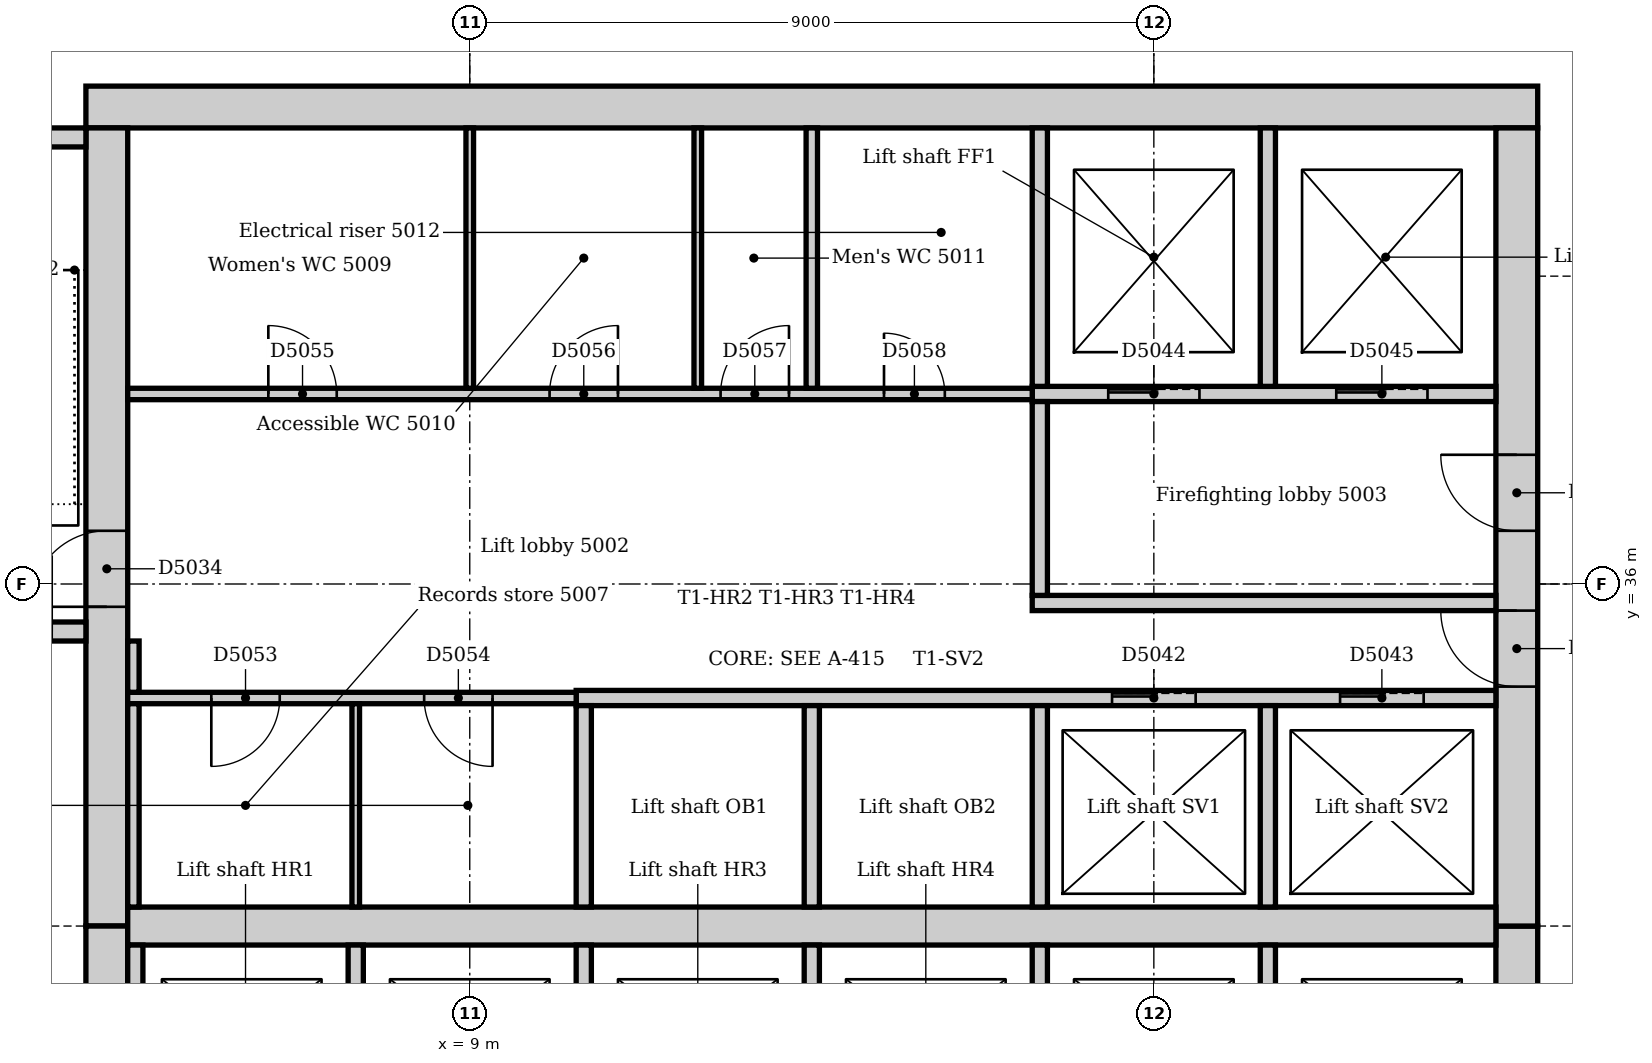
"""IFC4 building model, lengths in metres.
Left out: names, types, materials, properties, quantities, classifications, styles, units other than length and angle.
Written with IfcOpenShell. Run it as: python <this file> out.ifc"""

import sys

from ifc_helpers import new_model, si_unit, direction, frame, frame_2d, origin, place, context, subcontext, project, spatial, rectangle, extrude, element, fill, save


model = new_model("IFC4")
c1 = context("Model", 3, precision=1e-05, world=origin(), true_north=direction((0.0, 1.0)))
c2 = subcontext(c1, "Body", "Model", "MODEL_VIEW")
j1 = project(units=[si_unit("LENGTHUNIT", "METRE"), si_unit("PLANEANGLEUNIT", "RADIAN")], contexts=[c1])
p1 = place(None, origin())
s1 = spatial("IfcSite", under=j1, at=p1, CompositionType="ELEMENT")
p2 = place(p1, origin())
s2 = spatial("IfcBuilding", under=s1, at=p2, CompositionType="ELEMENT")
p3 = place(p2, frame((0.0, 0.0, 210.0)))
s3 = spatial("IfcBuildingStorey", under=s2, at=p3, CompositionType="ELEMENT", Elevation=210.0)
p4 = place(p3, frame((23.05, 42.275, 0.0), z_axis=(0.0, 0.0, 1.0), x_axis=(-1.0, 0.0, 0.0)))
e1 = element("IfcWall", 1, at=p4, inside=s3, PredefinedType="SOLIDWALL", context=c2, shape_type="SweptSolid", body=[
    extrude(rectangle(XDim=19.1, YDim=0.55, at=frame_2d((9.55, 0.0))), origin(), (0.0, 0.0, 1.0), 4.0),
])
p5 = place(p3, frame((22.775, 21.0, 0.0), z_axis=(0.0, 0.0, 1.0), x_axis=(0.0, 1.0, 0.0)))
e2 = element("IfcWall", 2, at=p5, inside=s3, PredefinedType="SOLIDWALL", context=c2, shape_type="SweptSolid", body=[
    extrude(rectangle(XDim=10.5, YDim=0.55, at=frame_2d((5.25, 0.0))), origin(), (0.0, 0.0, 1.0), 4.0),
])
p6 = place(p5, frame((4.35, 0.0, 0.0)))
e3 = element("IfcOpeningElement", 3, at=p6, cuts=e2, PredefinedType="OPENING", context=c2, shape_type="SweptSolid", body=[
    extrude(rectangle(XDim=1.8, YDim=2.1, at=frame_2d((0.9, 1.05))), frame((0.0, 0.285, 0.0), z_axis=(0.0, -1.0, 0.0), x_axis=(1.0, 0.0, 0.0)), (0.0, 0.0, 1.0), 0.57),
])
p7 = place(p3, frame((22.775, 31.5, 0.0), z_axis=(0.0, 0.0, 1.0), x_axis=(0.0, 1.0, 0.0)))
e4 = element("IfcWall", 4, at=p7, inside=s3, PredefinedType="SOLIDWALL", context=c2, shape_type="SweptSolid", body=[
    extrude(rectangle(XDim=10.5, YDim=0.55, at=frame_2d((5.25, 0.0))), origin(), (0.0, 0.0, 1.0), 4.0),
])
p8 = place(p7, frame((3.15, 0.0, 0.0)))
e5 = element("IfcOpeningElement", 5, at=p8, cuts=e4, PredefinedType="OPENING", context=c2, shape_type="SweptSolid", body=[
    extrude(rectangle(XDim=1.0, YDim=2.1, at=frame_2d((0.5, 1.05))), frame((0.0, 0.285, 0.0), z_axis=(0.0, -1.0, 0.0), x_axis=(1.0, 0.0, 0.0)), (0.0, 0.0, 1.0), 0.57),
])
p9 = place(p7, frame((5.2, 0.0, 0.0)))
e6 = element("IfcOpeningElement", 6, at=p9, cuts=e4, PredefinedType="OPENING", context=c2, shape_type="SweptSolid", body=[
    extrude(rectangle(XDim=1.0, YDim=2.1, at=frame_2d((0.5, 1.05))), frame((0.0, 0.285, 0.0), z_axis=(0.0, -1.0, 0.0), x_axis=(1.0, 0.0, 0.0)), (0.0, 0.0, 1.0), 0.57),
])
p10 = place(p3, frame((4.225, 42.0, 0.0), z_axis=(0.0, 0.0, 1.0), x_axis=(0.0, -1.0, 0.0)))
e7 = element("IfcWall", 7, at=p10, inside=s3, PredefinedType="SOLIDWALL", context=c2, shape_type="SweptSolid", body=[
    extrude(rectangle(XDim=10.5, YDim=0.55, at=frame_2d((5.25, 0.0))), origin(), (0.0, 0.0, 1.0), 4.0),
])
p11 = place(p10, frame((5.3, 0.0, 0.0)))
e8 = element("IfcOpeningElement", 8, at=p11, cuts=e7, PredefinedType="OPENING", context=c2, shape_type="SweptSolid", body=[
    extrude(rectangle(XDim=1.0, YDim=2.1, at=frame_2d((0.5, 1.05))), frame((0.0, 0.285, 0.0), z_axis=(0.0, -1.0, 0.0), x_axis=(1.0, 0.0, 0.0)), (0.0, 0.0, 1.0), 0.57),
])
p12 = place(p3, frame((4.225, 31.5, 0.0), z_axis=(0.0, 0.0, 1.0), x_axis=(0.0, -1.0, 0.0)))
e9 = element("IfcWall", 9, at=p12, inside=s3, PredefinedType="SOLIDWALL", context=c2, shape_type="SweptSolid", body=[
    extrude(rectangle(XDim=10.5, YDim=0.55, at=frame_2d((5.25, 0.0))), origin(), (0.0, 0.0, 1.0), 4.0),
])
p13 = place(p12, frame((4.25, 0.0, 0.0)))
e10 = element("IfcOpeningElement", 10, at=p13, cuts=e9, PredefinedType="OPENING", context=c2, shape_type="SweptSolid", body=[
    extrude(rectangle(XDim=1.0, YDim=2.1, at=frame_2d((0.5, 1.05))), frame((0.0, 0.285, 0.0), z_axis=(0.0, -1.0, 0.0), x_axis=(1.0, 0.0, 0.0)), (0.0, 0.0, 1.0), 0.57),
])
p14 = place(p3, frame((4.5, 31.5, 0.0), z_axis=(0.0, 0.0, 1.0), x_axis=(1.0, 0.0, 0.0)))
e11 = element("IfcWall", 11, at=p14, inside=s3, PredefinedType="SOLIDWALL", context=c2, shape_type="SweptSolid", body=[
    extrude(rectangle(XDim=18.0, YDim=0.5, at=frame_2d((9.0, 0.0))), origin(), (0.0, 0.0, 1.0), 4.0),
])
p15 = place(p3, frame((0.36, 35.375, 0.0), z_axis=(0.0, 0.0, 1.0), x_axis=(1.0, 0.0, 0.0)))
e12 = element("IfcWall", 12, at=p15, inside=s3, PredefinedType="SOLIDWALL", context=c2, shape_type="SweptSolid", body=[
    extrude(rectangle(XDim=3.59, YDim=0.25, at=frame_2d((1.795, 0.0))), origin(), (0.0, 0.0, 1.0), 4.0),
])
p16 = place(p15, frame((2.14, 0.0, 0.0)))
e13 = element("IfcOpeningElement", 13, at=p16, cuts=e12, PredefinedType="OPENING", context=c2, shape_type="SweptSolid", body=[
    extrude(rectangle(XDim=1.0, YDim=2.1, at=frame_2d((0.5, 1.05))), frame((0.0, 0.135, 0.0), z_axis=(0.0, -1.0, 0.0), x_axis=(1.0, 0.0, 0.0)), (0.0, 0.0, 1.0), 0.27),
])
p17 = place(p3, frame((3.95, 41.875, 0.0), z_axis=(0.0, 0.0, 1.0), x_axis=(-1.0, 0.0, 0.0)))
e14 = element("IfcWall", 14, at=p17, inside=s3, PredefinedType="SOLIDWALL", context=c2, shape_type="SweptSolid", body=[
    extrude(rectangle(XDim=3.59, YDim=0.25, at=frame_2d((1.795, 0.0))), origin(), (0.0, 0.0, 1.0), 4.0),
])
p18 = place(p3, frame((16.4, 35.75, 0.0), z_axis=(0.0, 0.0, 1.0), x_axis=(1.0, 0.0, 0.0)))
e15 = element("IfcWall", 15, at=p18, inside=s3, PredefinedType="PARTITIONING", context=c2, shape_type="SweptSolid", body=[
    extrude(rectangle(XDim=6.1, YDim=0.2, at=frame_2d((3.05, 0.0))), origin(), (0.0, 0.0, 1.0), 3.85),
])
p19 = place(p3, frame((16.4, 38.5, 0.0), z_axis=(0.0, 0.0, 1.0), x_axis=(1.0, 0.0, 0.0)))
e16 = element("IfcWall", 16, at=p19, inside=s3, PredefinedType="PARTITIONING", context=c2, shape_type="SweptSolid", body=[
    extrude(rectangle(XDim=6.1, YDim=0.2, at=frame_2d((3.05, 0.0))), origin(), (0.0, 0.0, 1.0), 3.85),
])
p20 = place(p19, frame((1.0, 0.0, 0.0)))
e17 = element("IfcOpeningElement", 17, at=p20, cuts=e16, PredefinedType="OPENING", context=c2, shape_type="SweptSolid", body=[
    extrude(rectangle(XDim=1.2, YDim=2.1, at=frame_2d((0.6, 1.05))), frame((0.0, 0.11, 0.0), z_axis=(0.0, -1.0, 0.0), x_axis=(1.0, 0.0, 0.0)), (0.0, 0.0, 1.0), 0.22),
])
p21 = place(p19, frame((4.0, 0.0, 0.0)))
e18 = element("IfcOpeningElement", 18, at=p21, cuts=e16, PredefinedType="OPENING", context=c2, shape_type="SweptSolid", body=[
    extrude(rectangle(XDim=1.2, YDim=2.1, at=frame_2d((0.6, 1.05))), frame((0.0, 0.11, 0.0), z_axis=(0.0, -1.0, 0.0), x_axis=(1.0, 0.0, 0.0)), (0.0, 0.0, 1.0), 0.22),
])
p22 = place(p3, frame((16.5, 35.85, 0.0), z_axis=(0.0, 0.0, 1.0), x_axis=(0.0, 1.0, 0.0)))
e19 = element("IfcWall", 19, at=p22, inside=s3, PredefinedType="PARTITIONING", context=c2, shape_type="SweptSolid", body=[
    extrude(rectangle(XDim=2.55, YDim=0.2, at=frame_2d((1.275, 0.0))), origin(), (0.0, 0.0, 1.0), 3.85),
])
p23 = place(p3, frame((10.4, 34.5, 0.0), z_axis=(0.0, 0.0, 1.0), x_axis=(1.0, 0.0, 0.0)))
e20 = element("IfcWall", 20, at=p23, inside=s3, PredefinedType="PARTITIONING", context=c2, shape_type="SweptSolid", body=[
    extrude(rectangle(XDim=12.1, YDim=0.2, at=frame_2d((6.05, 0.0))), origin(), (0.0, 0.0, 1.0), 3.85),
])
p24 = place(p23, frame((7.05, 0.0, 0.0)))
e21 = element("IfcOpeningElement", 21, at=p24, cuts=e20, PredefinedType="OPENING", context=c2, shape_type="SweptSolid", body=[
    extrude(rectangle(XDim=1.1, YDim=2.1, at=frame_2d((0.55, 1.05))), frame((0.0, 0.11, 0.0), z_axis=(0.0, -1.0, 0.0), x_axis=(1.0, 0.0, 0.0)), (0.0, 0.0, 1.0), 0.22),
])
p25 = place(p23, frame((10.05, 0.0, 0.0)))
e22 = element("IfcOpeningElement", 22, at=p25, cuts=e20, PredefinedType="OPENING", context=c2, shape_type="SweptSolid", body=[
    extrude(rectangle(XDim=1.1, YDim=2.1, at=frame_2d((0.55, 1.05))), frame((0.0, 0.11, 0.0), z_axis=(0.0, -1.0, 0.0), x_axis=(1.0, 0.0, 0.0)), (0.0, 0.0, 1.0), 0.22),
])
for number, where, z_axis, x_axis in (
    (23, (10.5, 28.6, 0.0), (0.0, 0.0, 1.0), (0.0, 1.0, 0.0)),
    (24, (10.5, 31.75, 0.0), (0.0, 0.0, 1.0), (0.0, 1.0, 0.0)),
    (25, (13.5, 28.6, 0.0), (0.0, 0.0, 1.0), (0.0, 1.0, 0.0)),
    (26, (13.5, 31.75, 0.0), (0.0, 0.0, 1.0), (0.0, 1.0, 0.0)),
    (27, (16.5, 28.6, 0.0), (0.0, 0.0, 1.0), (0.0, 1.0, 0.0)),
    (28, (16.5, 31.75, 0.0), (0.0, 0.0, 1.0), (0.0, 1.0, 0.0)),
    (29, (19.5, 28.6, 0.0), (0.0, 0.0, 1.0), (0.0, 1.0, 0.0)),
    (30, (19.5, 31.75, 0.0), (0.0, 0.0, 1.0), (0.0, 1.0, 0.0)),
):
    element("IfcWall", number, at=place(p3, frame(where, z_axis=z_axis, x_axis=x_axis)), inside=s3, PredefinedType="PARTITIONING", context=c2, shape_type="SweptSolid", body=[
        extrude(rectangle(XDim=2.65, YDim=0.2, at=frame_2d((1.325, 0.0))), origin(), (0.0, 0.0, 1.0), 3.85),
    ])
for number, where, z_axis, x_axis in (
    (31, (16.5, 38.6, 0.0), (0.0, 0.0, 1.0), (0.0, 1.0, 0.0)),
    (32, (19.5, 38.6, 0.0), (0.0, 0.0, 1.0), (0.0, 1.0, 0.0)),
):
    element("IfcWall", number, at=place(p3, frame(where, z_axis=z_axis, x_axis=x_axis)), inside=s3, PredefinedType="PARTITIONING", context=c2, shape_type="SweptSolid", body=[
        extrude(rectangle(XDim=3.4, YDim=0.2, at=frame_2d((1.7, 0.0))), origin(), (0.0, 0.0, 1.0), 3.85),
    ])
for number, where, z_axis, x_axis in (
    (33, (4.6, 28.6, 0.0), (0.0, 0.0, 1.0), (0.0, 1.0, 0.0)),
    (34, (7.5, 28.6, 0.0), (0.0, 0.0, 1.0), (0.0, 1.0, 0.0)),
):
    element("IfcWall", number, at=place(p3, frame(where, z_axis=z_axis, x_axis=x_axis)), inside=s3, PredefinedType="PARTITIONING", context=c2, shape_type="SweptSolid", body=[
        extrude(rectangle(XDim=2.65, YDim=0.2, at=frame_2d((1.325, 0.0))), origin(), (0.0, 0.0, 1.0), 3.85),
    ])
p26 = place(p3, frame((4.5, 38.5, 0.0), z_axis=(0.0, 0.0, 1.0), x_axis=(1.0, 0.0, 0.0)))
e35 = element("IfcWall", 35, at=p26, inside=s3, PredefinedType="PARTITIONING", context=c2, shape_type="SweptSolid", body=[
    extrude(rectangle(XDim=11.9, YDim=0.15, at=frame_2d((5.95, 0.0))), origin(), (0.0, 0.0, 1.0), 3.85),
])
p27 = place(p26, frame((1.85, 0.0, 0.0)))
e36 = element("IfcOpeningElement", 36, at=p27, cuts=e35, PredefinedType="OPENING", context=c2, shape_type="SweptSolid", body=[
    extrude(rectangle(XDim=0.9, YDim=2.1, at=frame_2d((0.45, 1.05))), frame((0.0, 0.085, 0.0), z_axis=(0.0, -1.0, 0.0), x_axis=(1.0, 0.0, 0.0)), (0.0, 0.0, 1.0), 0.17),
])
p28 = place(p26, frame((5.55, 0.0, 0.0)))
e37 = element("IfcOpeningElement", 37, at=p28, cuts=e35, PredefinedType="OPENING", context=c2, shape_type="SweptSolid", body=[
    extrude(rectangle(XDim=0.9, YDim=2.1, at=frame_2d((0.45, 1.05))), frame((0.0, 0.085, 0.0), z_axis=(0.0, -1.0, 0.0), x_axis=(1.0, 0.0, 0.0)), (0.0, 0.0, 1.0), 0.17),
])
p29 = place(p26, frame((7.8, 0.0, 0.0)))
e38 = element("IfcOpeningElement", 38, at=p29, cuts=e35, PredefinedType="OPENING", context=c2, shape_type="SweptSolid", body=[
    extrude(rectangle(XDim=0.9, YDim=2.1, at=frame_2d((0.45, 1.05))), frame((0.0, 0.085, 0.0), z_axis=(0.0, -1.0, 0.0), x_axis=(1.0, 0.0, 0.0)), (0.0, 0.0, 1.0), 0.17),
])
p30 = place(p26, frame((9.95, 0.0, 0.0)))
e39 = element("IfcOpeningElement", 39, at=p30, cuts=e35, PredefinedType="OPENING", context=c2, shape_type="SweptSolid", body=[
    extrude(rectangle(XDim=0.8, YDim=2.1, at=frame_2d((0.4, 1.05))), frame((0.0, 0.085, 0.0), z_axis=(0.0, -1.0, 0.0), x_axis=(1.0, 0.0, 0.0)), (0.0, 0.0, 1.0), 0.17),
])
p31 = place(p3, frame((4.5, 34.5, 0.0), z_axis=(0.0, 0.0, 1.0), x_axis=(1.0, 0.0, 0.0)))
e40 = element("IfcWall", 40, at=p31, inside=s3, PredefinedType="PARTITIONING", context=c2, shape_type="SweptSolid", body=[
    extrude(rectangle(XDim=5.9, YDim=0.15, at=frame_2d((2.95, 0.0))), origin(), (0.0, 0.0, 1.0), 3.85),
])
p32 = place(p31, frame((1.1, 0.0, 0.0)))
e41 = element("IfcOpeningElement", 41, at=p32, cuts=e40, PredefinedType="OPENING", context=c2, shape_type="SweptSolid", body=[
    extrude(rectangle(XDim=0.9, YDim=2.1, at=frame_2d((0.45, 1.05))), frame((0.0, 0.085, 0.0), z_axis=(0.0, -1.0, 0.0), x_axis=(1.0, 0.0, 0.0)), (0.0, 0.0, 1.0), 0.17),
])
p33 = place(p31, frame((3.9, 0.0, 0.0)))
e42 = element("IfcOpeningElement", 42, at=p33, cuts=e40, PredefinedType="OPENING", context=c2, shape_type="SweptSolid", body=[
    extrude(rectangle(XDim=0.9, YDim=2.1, at=frame_2d((0.45, 1.05))), frame((0.0, 0.085, 0.0), z_axis=(0.0, -1.0, 0.0), x_axis=(1.0, 0.0, 0.0)), (0.0, 0.0, 1.0), 0.17),
])
p34 = place(p3, frame((4.575, 34.575, 0.0), z_axis=(0.0, 0.0, 1.0), x_axis=(0.0, 1.0, 0.0)))
e43 = element("IfcWall", 43, at=p34, inside=s3, PredefinedType="PARTITIONING", context=c2, shape_type="SweptSolid", body=[
    extrude(rectangle(XDim=0.675, YDim=0.15, at=frame_2d((0.338, 0.0))), origin(), (0.0, 0.0, 1.0), 3.85),
])
p35 = place(p3, frame((4.575, 31.75, 0.0), z_axis=(0.0, 0.0, 1.0), x_axis=(0.0, 1.0, 0.0)))
e44 = element("IfcWall", 44, at=p35, inside=s3, PredefinedType="PARTITIONING", context=c2, shape_type="SweptSolid", body=[
    extrude(rectangle(XDim=2.675, YDim=0.15, at=frame_2d((1.337, 0.0))), origin(), (0.0, 0.0, 1.0), 3.85),
])
p36 = place(p3, frame((13.5, 38.575, 0.0), z_axis=(0.0, 0.0, 1.0), x_axis=(0.0, 1.0, 0.0)))
e45 = element("IfcWall", 45, at=p36, inside=s3, PredefinedType="PARTITIONING", context=c2, shape_type="SweptSolid", body=[
    extrude(rectangle(XDim=3.425, YDim=0.15, at=frame_2d((1.712, 0.0))), origin(), (0.0, 0.0, 1.0), 3.85),
])
for number, where, z_axis, x_axis in (
    (46, (9.0, 38.575, 0.0), (0.0, 0.0, 1.0), (0.0, 1.0, 0.0)),
    (47, (12.0, 38.575, 0.0), (0.0, 0.0, 1.0), (0.0, 1.0, 0.0)),
):
    element("IfcWall", number, at=place(p3, frame(where, z_axis=z_axis, x_axis=x_axis)), inside=s3, PredefinedType="PARTITIONING", context=c2, shape_type="SweptSolid", body=[
        extrude(rectangle(XDim=3.425, YDim=0.1, at=frame_2d((1.712, 0.0))), origin(), (0.0, 0.0, 1.0), 3.85),
    ])
p37 = place(p3, frame((7.5, 31.75, 0.0), z_axis=(0.0, 0.0, 1.0), x_axis=(0.0, 1.0, 0.0)))
e48 = element("IfcWall", 48, at=p37, inside=s3, PredefinedType="PARTITIONING", context=c2, shape_type="SweptSolid", body=[
    extrude(rectangle(XDim=2.675, YDim=0.1, at=frame_2d((1.337, 0.0))), origin(), (0.0, 0.0, 1.0), 3.85),
])
p38 = place(p11, frame((1.0, 0.0, 0.0), z_axis=(0.0, 0.0, 1.0), x_axis=(-1.0, 0.0, 0.0)))
e49 = element("IfcDoor", 49, at=p38, inside=s3, OperationType="SINGLE_SWING_LEFT", PredefinedType="DOOR", context=c2, shape_type="SweptSolid", body=[
    extrude(rectangle(XDim=1.0, YDim=2.1, at=frame_2d((0.5, 1.05))), frame((0.0, 0.025, 0.0), z_axis=(0.0, -1.0, 0.0), x_axis=(1.0, 0.0, 0.0)), (0.0, 0.0, 1.0), 0.05),
])
fill(e8, e49)
p39 = place(p24, origin())
e50 = element("IfcDoor", 50, at=p39, inside=s3, OperationType="SLIDING_TO_LEFT", PredefinedType="DOOR", context=c2, shape_type="SweptSolid", body=[
    extrude(rectangle(XDim=1.1, YDim=2.1, at=frame_2d((0.55, 1.05))), frame((0.0, 0.025, 0.0), z_axis=(0.0, -1.0, 0.0), x_axis=(1.0, 0.0, 0.0)), (0.0, 0.0, 1.0), 0.05),
])
fill(e21, e50)
p40 = place(p25, origin())
e51 = element("IfcDoor", 51, at=p40, inside=s3, OperationType="SLIDING_TO_LEFT", PredefinedType="DOOR", context=c2, shape_type="SweptSolid", body=[
    extrude(rectangle(XDim=1.1, YDim=2.1, at=frame_2d((0.55, 1.05))), frame((0.0, 0.025, 0.0), z_axis=(0.0, -1.0, 0.0), x_axis=(1.0, 0.0, 0.0)), (0.0, 0.0, 1.0), 0.05),
])
fill(e22, e51)
p41 = place(p20, origin())
e52 = element("IfcDoor", 52, at=p41, inside=s3, OperationType="SLIDING_TO_LEFT", PredefinedType="DOOR", context=c2, shape_type="SweptSolid", body=[
    extrude(rectangle(XDim=1.2, YDim=2.1, at=frame_2d((0.6, 1.05))), frame((0.0, 0.025, 0.0), z_axis=(0.0, -1.0, 0.0), x_axis=(1.0, 0.0, 0.0)), (0.0, 0.0, 1.0), 0.05),
])
fill(e17, e52)
p42 = place(p21, origin())
e53 = element("IfcDoor", 53, at=p42, inside=s3, OperationType="SLIDING_TO_LEFT", PredefinedType="DOOR", context=c2, shape_type="SweptSolid", body=[
    extrude(rectangle(XDim=1.2, YDim=2.1, at=frame_2d((0.6, 1.05))), frame((0.0, 0.025, 0.0), z_axis=(0.0, -1.0, 0.0), x_axis=(1.0, 0.0, 0.0)), (0.0, 0.0, 1.0), 0.05),
])
fill(e18, e53)
p43 = place(p8, origin())
e54 = element("IfcDoor", 54, at=p43, inside=s3, OperationType="SINGLE_SWING_RIGHT", PredefinedType="DOOR", context=c2, shape_type="SweptSolid", body=[
    extrude(rectangle(XDim=1.0, YDim=2.1, at=frame_2d((0.5, 1.05))), frame((0.0, 0.025, 0.0), z_axis=(0.0, -1.0, 0.0), x_axis=(1.0, 0.0, 0.0)), (0.0, 0.0, 1.0), 0.05),
])
fill(e5, e54)
p44 = place(p9, origin())
e55 = element("IfcDoor", 55, at=p44, inside=s3, OperationType="SINGLE_SWING_RIGHT", PredefinedType="DOOR", context=c2, shape_type="SweptSolid", body=[
    extrude(rectangle(XDim=1.0, YDim=2.1, at=frame_2d((0.5, 1.05))), frame((0.0, 0.025, 0.0), z_axis=(0.0, -1.0, 0.0), x_axis=(1.0, 0.0, 0.0)), (0.0, 0.0, 1.0), 0.05),
])
fill(e6, e55)
p45 = place(p32, frame((0.9, 0.0, 0.0), z_axis=(0.0, 0.0, 1.0), x_axis=(-1.0, 0.0, 0.0)))
e56 = element("IfcDoor", 56, at=p45, inside=s3, OperationType="SINGLE_SWING_RIGHT", PredefinedType="DOOR", context=c2, shape_type="SweptSolid", body=[
    extrude(rectangle(XDim=0.9, YDim=2.1, at=frame_2d((0.45, 1.05))), frame((0.0, 0.025, 0.0), z_axis=(0.0, -1.0, 0.0), x_axis=(1.0, 0.0, 0.0)), (0.0, 0.0, 1.0), 0.05),
])
fill(e41, e56)
p46 = place(p33, frame((0.9, 0.0, 0.0), z_axis=(0.0, 0.0, 1.0), x_axis=(-1.0, 0.0, 0.0)))
e57 = element("IfcDoor", 57, at=p46, inside=s3, OperationType="SINGLE_SWING_LEFT", PredefinedType="DOOR", context=c2, shape_type="SweptSolid", body=[
    extrude(rectangle(XDim=0.9, YDim=2.1, at=frame_2d((0.45, 1.05))), frame((0.0, 0.025, 0.0), z_axis=(0.0, -1.0, 0.0), x_axis=(1.0, 0.0, 0.0)), (0.0, 0.0, 1.0), 0.05),
])
fill(e42, e57)
p47 = place(p27, origin())
e58 = element("IfcDoor", 58, at=p47, inside=s3, OperationType="SINGLE_SWING_LEFT", PredefinedType="DOOR", context=c2, shape_type="SweptSolid", body=[
    extrude(rectangle(XDim=0.9, YDim=2.1, at=frame_2d((0.45, 1.05))), frame((0.0, 0.025, 0.0), z_axis=(0.0, -1.0, 0.0), x_axis=(1.0, 0.0, 0.0)), (0.0, 0.0, 1.0), 0.05),
])
fill(e36, e58)
p48 = place(p28, origin())
e59 = element("IfcDoor", 59, at=p48, inside=s3, OperationType="SINGLE_SWING_RIGHT", PredefinedType="DOOR", context=c2, shape_type="SweptSolid", body=[
    extrude(rectangle(XDim=0.9, YDim=2.1, at=frame_2d((0.45, 1.05))), frame((0.0, 0.025, 0.0), z_axis=(0.0, -1.0, 0.0), x_axis=(1.0, 0.0, 0.0)), (0.0, 0.0, 1.0), 0.05),
])
fill(e37, e59)
p49 = place(p29, origin())
e60 = element("IfcDoor", 60, at=p49, inside=s3, OperationType="SINGLE_SWING_RIGHT", PredefinedType="DOOR", context=c2, shape_type="SweptSolid", body=[
    extrude(rectangle(XDim=0.9, YDim=2.1, at=frame_2d((0.45, 1.05))), frame((0.0, 0.025, 0.0), z_axis=(0.0, -1.0, 0.0), x_axis=(1.0, 0.0, 0.0)), (0.0, 0.0, 1.0), 0.05),
])
fill(e38, e60)
p50 = place(p30, origin())
e61 = element("IfcDoor", 61, at=p50, inside=s3, OperationType="SINGLE_SWING_LEFT", PredefinedType="DOOR", context=c2, shape_type="SweptSolid", body=[
    extrude(rectangle(XDim=0.8, YDim=2.1, at=frame_2d((0.4, 1.05))), frame((0.0, 0.025, 0.0), z_axis=(0.0, -1.0, 0.0), x_axis=(1.0, 0.0, 0.0)), (0.0, 0.0, 1.0), 0.05),
])
fill(e39, e61)
save(model, sys.argv[1])
